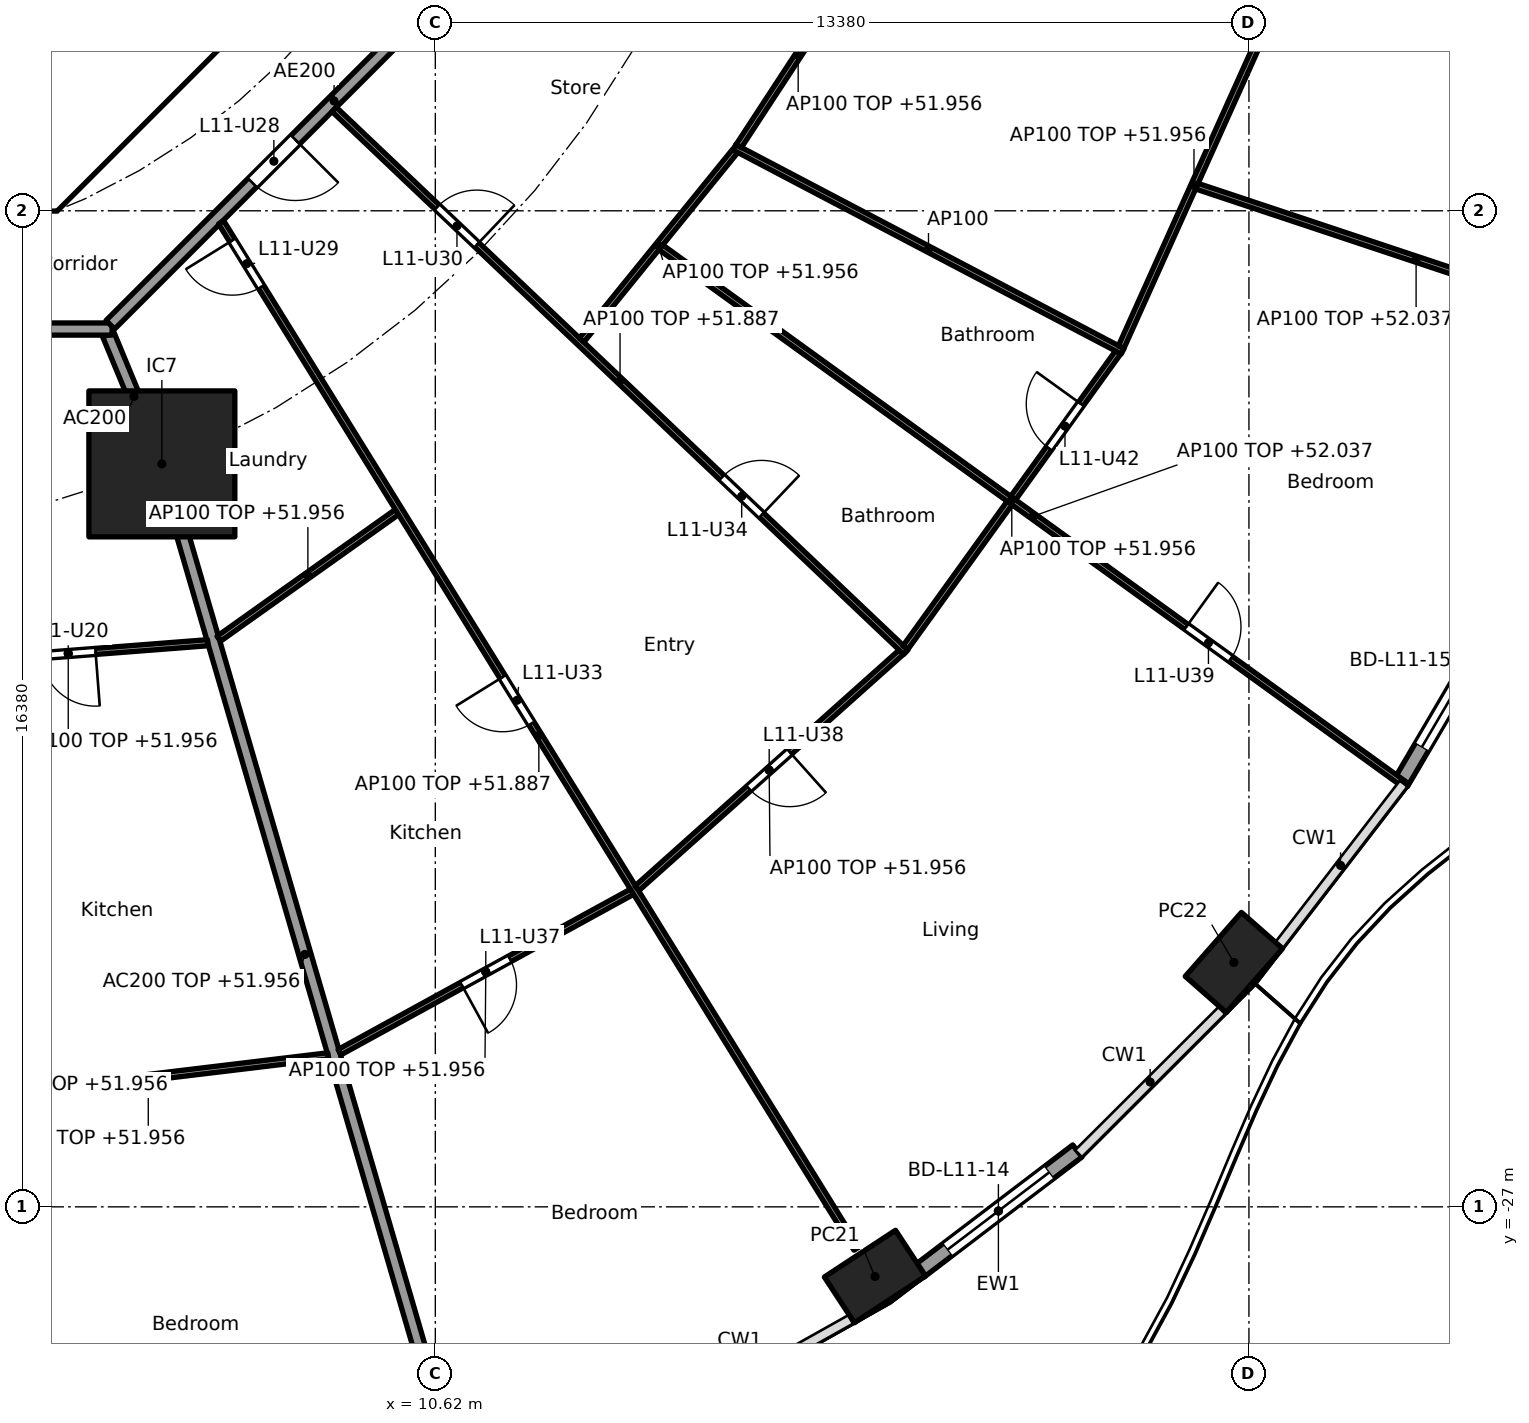
"""IFC4 building model, lengths in metres.
Left out: names, types, materials, properties, quantities, classifications, styles, units other than length and angle.
Written with IfcOpenShell. Run it as: python <this file> out.ifc"""

import sys

from ifc_helpers import new_model, si_unit, direction, frame, frame_2d, origin, origin_2d, place, context, subcontext, project, spatial, polyline, rectangle, hollow_rectangle, outline, extrude, element, fill, save


model = new_model("IFC4")
c1 = context("Model", 3, precision=1e-05, world=origin(), true_north=direction((0.0, 1.0)))
c2 = subcontext(c1, "Body", "Model", "MODEL_VIEW")
j1 = project(units=[si_unit("LENGTHUNIT", "METRE"), si_unit("PLANEANGLEUNIT", "RADIAN")], contexts=[c1])
p1 = place(None, origin())
s1 = spatial("IfcSite", under=j1, at=p1, CompositionType="ELEMENT")
p2 = place(p1, origin())
s2 = spatial("IfcBuilding", under=s1, at=p2, CompositionType="ELEMENT")
p3 = place(p2, frame((0.0, 0.0, 49.2)))
s3 = spatial("IfcBuildingStorey", under=s2, at=p3, CompositionType="ELEMENT", Elevation=49.2)
for number, where, z_axis, x_axis in (
    (1, (17.85, -28.146, 0.0), (0.0, 0.0, 1.0), (0.836, 0.549, 0.0)),
    (2, (23.752, -22.981, 0.0), (0.0, 0.0, 1.0), (0.66, 0.751, 0.0)),
):
    element("IfcColumn", number, at=place(p3, frame(where, z_axis=z_axis, x_axis=x_axis)), inside=s3, PredefinedType="COLUMN", context=c2, shape_type="SweptSolid", body=[
        extrude(hollow_rectangle(XDim=1.4, YDim=0.9, WallThickness=0.05, at=origin_2d()), origin(), (0.0, 0.0, 1.0), 3.7),
    ])
p4 = place(p3, frame((6.123, -14.782, 0.0), z_axis=(0.0, 0.0, 1.0), x_axis=(1.0, 0.0, 0.0)))
e3 = element("IfcColumn", 3, at=p4, inside=s3, PredefinedType="COLUMN", context=c2, shape_type="SweptSolid", body=[
    extrude(rectangle(XDim=2.4, YDim=2.4, at=origin_2d()), origin(), (0.0, 0.0, 1.0), 3.7),
])
p5 = place(p3, frame((21.178, -26.081, 0.0), z_axis=(0.0, 0.0, 1.0), x_axis=(-0.796022293214, -0.605267303517, 0.0)))
e4 = element("IfcWall", 4, at=p5, inside=s3, PredefinedType="SOLIDWALL", context=c2, shape_type="SweptSolid", body=[
    extrude(rectangle(XDim=3.262, YDim=0.25, at=frame_2d((1.631, 0.0))), origin(), (0.0, 0.0, 1.0), 3.44),
])
p6 = place(p5, frame((0.581, 0.0, 0.0)))
e5 = element("IfcOpeningElement", 5, at=p6, cuts=e4, PredefinedType="OPENING", context=c2, shape_type="SweptSolid", body=[
    extrude(rectangle(XDim=2.1, YDim=2.4, at=frame_2d((1.05, 1.2))), frame((0.0, 0.135, 0.0), z_axis=(0.0, -1.0, 0.0), x_axis=(1.0, 0.0, 0.0)), (0.0, 0.0, 1.0), 0.27),
])
p7 = place(p3, frame((28.252, -17.04, 0.0), z_axis=(0.0, 0.0, 1.0), x_axis=(-0.506311160839, -0.862350861546, 0.0)))
e6 = element("IfcWall", 6, at=p7, inside=s3, PredefinedType="SOLIDWALL", context=c2, shape_type="SweptSolid", body=[
    extrude(rectangle(XDim=3.462, YDim=0.25, at=frame_2d((1.731, 0.0))), origin(), (0.0, 0.0, 1.0), 3.44),
])
p8 = place(p7, frame((0.681, 0.0, 0.0)))
e7 = element("IfcOpeningElement", 7, at=p8, cuts=e6, PredefinedType="OPENING", context=c2, shape_type="SweptSolid", body=[
    extrude(rectangle(XDim=2.1, YDim=2.4, at=frame_2d((1.05, 1.2))), frame((0.0, 0.135, 0.0), z_axis=(0.0, -1.0, 0.0), x_axis=(1.0, 0.0, 0.0)), (0.0, 0.0, 1.0), 0.27),
])
p9 = place(p3, frame((4.613, -9.988, 0.0), z_axis=(0.0, 0.0, 1.0), x_axis=(0.707106781187, 0.707106781187, 0.0)))
e8 = element("IfcWall", 8, at=p9, inside=s3, PredefinedType="SHEAR", context=c2, shape_type="SweptSolid", body=[
    extrude(rectangle(XDim=7.602, YDim=0.6, at=frame_2d((3.801, 0.0))), origin(), (0.0, 0.0, 1.0), 3.44),
])
p10 = place(p9, frame((3.201, 0.0, 0.0)))
e9 = element("IfcOpeningElement", 9, at=p10, cuts=e8, PredefinedType="OPENING", context=c2, shape_type="SweptSolid", body=[
    extrude(rectangle(XDim=1.2, YDim=2.1, at=frame_2d((0.6, 1.05))), frame((0.0, 0.31, 0.0), z_axis=(0.0, -1.0, 0.0), x_axis=(1.0, 0.0, 0.0)), (0.0, 0.0, 1.0), 0.62),
])
p11 = place(p3, origin())
e10 = element("IfcWall", 10, at=p11, inside=s3, PredefinedType="SHEAR", context=c2, shape_type="SweptSolid", body=[
    extrude(outline(polyline([(-4.152, -10.025), (4.152, -10.025), (4.401, -9.776), (4.825, -10.2), (4.401, -10.625), (-4.401, -10.625), (-4.825, -10.2), (-4.401, -9.776), (-4.152, -10.025)])), origin(), (0.0, 0.0, 1.0), 3.44),
])
p12 = place(p3, frame((5.243, -12.657, 0.0), z_axis=(0.0, 0.0, 1.0), x_axis=(0.382707856524, -0.923869415315, 0.0)))
e11 = element("IfcWall", 11, at=p12, inside=s3, PredefinedType="PARTITIONING", context=c2, shape_type="SweptSolid", body=[
    extrude(rectangle(XDim=2.2, YDim=0.2, at=frame_2d((1.1, 0.0))), origin(), (0.0, 0.0, 1.0), 3.44),
])
p13 = place(p3, frame((6.137, -14.83, 0.0), z_axis=(0.0, 0.0, 1.0), x_axis=(0.27985745069, -0.960041565399, 0.0)))
e12 = element("IfcWall", 12, at=p13, inside=s3, PredefinedType="PARTITIONING", context=c2, shape_type="SweptSolid", body=[
    extrude(rectangle(XDim=16.705, YDim=0.2, at=frame_2d((8.353, 0.0))), origin(), (0.0, 0.0, 1.0), 2.756),
])
p14 = place(p3, frame((-5.104, -12.565, 0.0), z_axis=(0.0, 0.0, 1.0), x_axis=(1.0, 0.0, 0.0)))
e13 = element("IfcWall", 13, at=p14, inside=s3, PredefinedType="PARTITIONING", context=c2, shape_type="SweptSolid", body=[
    extrude(rectangle(XDim=10.409, YDim=0.2, at=frame_2d((5.205, 0.0))), origin(), (0.0, 0.0, 1.0), 3.44),
])
p15 = place(p14, frame((2.87, 0.0, 0.0)))
e14 = element("IfcOpeningElement", 14, at=p15, cuts=e13, PredefinedType="OPENING", context=c2, shape_type="SweptSolid", body=[
    extrude(rectangle(XDim=1.0, YDim=2.1, at=frame_2d((0.5, 1.05))), frame((0.0, 0.11, 0.0), z_axis=(0.0, -1.0, 0.0), x_axis=(1.0, 0.0, 0.0)), (0.0, 0.0, 1.0), 0.22),
])
p16 = place(p3, frame((5.275, -12.494, 0.0), z_axis=(0.0, 0.0, 1.0), x_axis=(0.707106781187, 0.707106781187, 0.0)))
e15 = element("IfcWall", 15, at=p16, inside=s3, PredefinedType="PARTITIONING", context=c2, shape_type="SweptSolid", body=[
    extrude(rectangle(XDim=10.409, YDim=0.2, at=frame_2d((5.205, 0.0))), origin(), (0.0, 0.0, 1.0), 3.44),
])
p17 = place(p16, frame((3.303, 0.0, 0.0)))
e16 = element("IfcOpeningElement", 16, at=p17, cuts=e15, PredefinedType="OPENING", context=c2, shape_type="SweptSolid", body=[
    extrude(rectangle(XDim=1.0, YDim=2.1, at=frame_2d((0.5, 1.05))), frame((0.0, 0.11, 0.0), z_axis=(0.0, -1.0, 0.0), x_axis=(1.0, 0.0, 0.0)), (0.0, 0.0, 1.0), 0.22),
])
p18 = place(p3, frame((2.288, -18.078, 0.0), z_axis=(0.0, 0.0, 1.0), x_axis=(0.99701850123, 0.077162868047, 0.0)))
e17 = element("IfcWall", 17, at=p18, inside=s3, PredefinedType="PARTITIONING", context=c2, shape_type="SweptSolid", body=[
    extrude(rectangle(XDim=4.604, YDim=0.1, at=frame_2d((2.302, 0.0))), origin(), (0.0, 0.0, 1.0), 2.756),
])
p19 = place(p18, frame((1.852, 0.0, 0.0)))
e18 = element("IfcOpeningElement", 18, at=p19, cuts=e17, PredefinedType="OPENING", context=c2, shape_type="SweptSolid", body=[
    extrude(rectangle(XDim=0.9, YDim=2.1, at=frame_2d((0.45, 1.05))), frame((0.0, 0.06, 0.0), z_axis=(0.0, -1.0, 0.0), x_axis=(1.0, 0.0, 0.0)), (0.0, 0.0, 1.0), 0.12),
])
p20 = place(p3, frame((2.941, -25.229, 0.0), z_axis=(0.0, 0.0, 1.0), x_axis=(0.992834127896, 0.119500604542, 0.0)))
e19 = element("IfcWall", 19, at=p20, inside=s3, PredefinedType="PARTITIONING", context=c2, shape_type="SweptSolid", body=[
    extrude(rectangle(XDim=5.959, YDim=0.1, at=frame_2d((2.98, 0.0))), origin(), (0.0, 0.0, 1.0), 2.756),
])
p21 = place(p3, frame((7.06, -17.657, 0.0), z_axis=(0.0, 0.0, 1.0), x_axis=(0.81492039338, 0.57957290521, 0.0)))
e20 = element("IfcWall", 20, at=p21, inside=s3, PredefinedType="PARTITIONING", context=c2, shape_type="SweptSolid", body=[
    extrude(rectangle(XDim=3.594, YDim=0.1, at=frame_2d((1.797, 0.0))), origin(), (0.0, 0.0, 1.0), 2.756),
])
p22 = place(p3, frame((9.045, -24.456, 0.0), z_axis=(0.0, 0.0, 1.0), x_axis=(0.876809987787, 0.480837025734, 0.0)))
e21 = element("IfcWall", 21, at=p22, inside=s3, PredefinedType="PARTITIONING", context=c2, shape_type="SweptSolid", body=[
    extrude(rectangle(XDim=5.486, YDim=0.1, at=frame_2d((2.743, 0.0))), origin(), (0.0, 0.0, 1.0), 2.756),
])
p23 = place(p22, frame((2.293, 0.0, 0.0)))
e22 = element("IfcOpeningElement", 22, at=p23, cuts=e21, PredefinedType="OPENING", context=c2, shape_type="SweptSolid", body=[
    extrude(rectangle(XDim=0.9, YDim=2.1, at=frame_2d((0.45, 1.05))), frame((0.0, 0.06, 0.0), z_axis=(0.0, -1.0, 0.0), x_axis=(1.0, 0.0, 0.0)), (0.0, 0.0, 1.0), 0.12),
])
p24 = place(p3, frame((7.097, -10.81, 0.0), z_axis=(0.0, 0.0, 1.0), x_axis=(0.526453266471, -0.850204068576, 0.0)))
e23 = element("IfcWall", 23, at=p24, inside=s3, PredefinedType="PARTITIONING", context=c2, shape_type="SweptSolid", body=[
    extrude(rectangle(XDim=19.85, YDim=0.1, at=frame_2d((9.925, 0.0))), origin(), (0.0, 0.0, 1.0), 2.687),
])
p25 = place(p24, frame((0.35, 0.0, 0.0)))
e24 = element("IfcOpeningElement", 24, at=p25, cuts=e23, PredefinedType="OPENING", context=c2, shape_type="SweptSolid", body=[
    extrude(rectangle(XDim=0.9, YDim=2.1, at=frame_2d((0.45, 1.05))), frame((0.0, 0.06, 0.0), z_axis=(0.0, -1.0, 0.0), x_axis=(1.0, 0.0, 0.0)), (0.0, 0.0, 1.0), 0.12),
])
p26 = place(p24, frame((8.795, 0.0, 0.0)))
e25 = element("IfcOpeningElement", 25, at=p26, cuts=e23, PredefinedType="OPENING", context=c2, shape_type="SweptSolid", body=[
    extrude(rectangle(XDim=0.9, YDim=2.1, at=frame_2d((0.45, 1.05))), frame((0.0, 0.06, 0.0), z_axis=(0.0, -1.0, 0.0), x_axis=(1.0, 0.0, 0.0)), (0.0, 0.0, 1.0), 0.12),
])
p27 = place(p3, frame((13.936, -21.761, 0.0), z_axis=(0.0, 0.0, 1.0), x_axis=(0.745806142791, 0.666163041136, 0.0)))
e26 = element("IfcWall", 26, at=p27, inside=s3, PredefinedType="PARTITIONING", context=c2, shape_type="SweptSolid", body=[
    extrude(rectangle(XDim=5.831, YDim=0.1, at=frame_2d((2.915, 0.0))), origin(), (0.0, 0.0, 1.0), 2.756),
])
p28 = place(p27, frame((2.465, 0.0, 0.0)))
e27 = element("IfcOpeningElement", 27, at=p28, cuts=e26, PredefinedType="OPENING", context=c2, shape_type="SweptSolid", body=[
    extrude(rectangle(XDim=0.9, YDim=2.1, at=frame_2d((0.45, 1.05))), frame((0.0, 0.06, 0.0), z_axis=(0.0, -1.0, 0.0), x_axis=(1.0, 0.0, 0.0)), (0.0, 0.0, 1.0), 0.12),
])
p29 = place(p3, frame((8.957, -8.953, 0.0), z_axis=(0.0, 0.0, 1.0), x_axis=(0.725250022034, -0.688485588476, 0.0)))
e28 = element("IfcWall", 28, at=p29, inside=s3, PredefinedType="PARTITIONING", context=c2, shape_type="SweptSolid", body=[
    extrude(rectangle(XDim=12.963, YDim=0.1, at=frame_2d((6.481, 0.0))), origin(), (0.0, 0.0, 1.0), 2.687),
])
p30 = place(p29, frame((2.333, 0.0, 0.0)))
e29 = element("IfcOpeningElement", 29, at=p30, cuts=e28, PredefinedType="OPENING", context=c2, shape_type="SweptSolid", body=[
    extrude(rectangle(XDim=0.9, YDim=2.1, at=frame_2d((0.45, 1.05))), frame((0.0, 0.06, 0.0), z_axis=(0.0, -1.0, 0.0), x_axis=(1.0, 0.0, 0.0)), (0.0, 0.0, 1.0), 0.12),
])
p31 = place(p29, frame((8.79, 0.0, 0.0)))
e30 = element("IfcOpeningElement", 30, at=p31, cuts=e28, PredefinedType="OPENING", context=c2, shape_type="SweptSolid", body=[
    extrude(rectangle(XDim=0.9, YDim=2.1, at=frame_2d((0.45, 1.05))), frame((0.0, 0.06, 0.0), z_axis=(0.0, -1.0, 0.0), x_axis=(1.0, 0.0, 0.0)), (0.0, 0.0, 1.0), 0.12),
])
p32 = place(p3, frame((13.026, -12.747, 0.0), z_axis=(0.0, 0.0, 1.0), x_axis=(0.630126826288, 0.776492229705, 0.0)))
e31 = element("IfcWall", 31, at=p32, inside=s3, PredefinedType="PARTITIONING", context=c2, shape_type="SweptSolid", body=[
    extrude(rectangle(XDim=4.007, YDim=0.1, at=frame_2d((2.003, 0.0))), origin(), (0.0, 0.0, 1.0), 2.756),
])
p33 = place(p3, frame((18.351, -17.803, 0.0), z_axis=(0.0, 0.0, 1.0), x_axis=(0.584563700282, 0.811347817099, 0.0)))
e32 = element("IfcWall", 32, at=p33, inside=s3, PredefinedType="PARTITIONING", context=c2, shape_type="SweptSolid", body=[
    extrude(rectangle(XDim=5.984, YDim=0.1, at=frame_2d((2.992, 0.0))), origin(), (0.0, 0.0, 1.0), 2.756),
])
p34 = place(p33, frame((4.038, 0.0, 0.0)))
e33 = element("IfcOpeningElement", 33, at=p34, cuts=e32, PredefinedType="OPENING", context=c2, shape_type="SweptSolid", body=[
    extrude(rectangle(XDim=0.9, YDim=2.1, at=frame_2d((0.45, 1.05))), frame((0.0, 0.06, 0.0), z_axis=(0.0, -1.0, 0.0), x_axis=(1.0, 0.0, 0.0)), (0.0, 0.0, 1.0), 0.12),
])
p35 = place(p3, frame((14.329, -11.221, 0.0), z_axis=(0.0, 0.0, 1.0), x_axis=(0.810671130917, -0.58550176558, 0.0)))
e34 = element("IfcWall", 34, at=p35, inside=s3, PredefinedType="PARTITIONING", context=c2, shape_type="SweptSolid", body=[
    extrude(rectangle(XDim=15.106, YDim=0.1, at=frame_2d((7.553, 0.0))), origin(), (0.0, 0.0, 1.0), 2.837),
])
p36 = place(p35, frame((10.659, 0.0, 0.0)))
e35 = element("IfcOpeningElement", 35, at=p36, cuts=e34, PredefinedType="OPENING", context=c2, shape_type="SweptSolid", body=[
    extrude(rectangle(XDim=0.9, YDim=2.1, at=frame_2d((0.45, 1.05))), frame((0.0, 0.06, 0.0), z_axis=(0.0, -1.0, 0.0), x_axis=(1.0, 0.0, 0.0)), (0.0, 0.0, 1.0), 0.12),
])
p37 = place(p3, frame((15.538, -9.574, 0.0), z_axis=(0.0, 0.0, 1.0), x_axis=(0.88517945493, -0.465249752895, 0.0)))
e36 = element("IfcWall", 36, at=p37, inside=s3, PredefinedType="PARTITIONING", context=c2, shape_type="SweptSolid", body=[
    extrude(rectangle(XDim=7.213, YDim=0.1, at=frame_2d((3.606, 0.0))), origin(), (0.0, 0.0, 1.0), 3.44),
])
p38 = place(p3, frame((15.609, -9.556, 0.0), z_axis=(0.0, 0.0, 1.0), x_axis=(0.547641765292, 0.836712911881, 0.0)))
e37 = element("IfcWall", 37, at=p38, inside=s3, PredefinedType="PARTITIONING", context=c2, shape_type="SweptSolid", body=[
    extrude(rectangle(XDim=3.57, YDim=0.1, at=frame_2d((1.785, 0.0))), origin(), (0.0, 0.0, 1.0), 2.756),
])
p39 = place(p3, frame((21.899, -12.861, 0.0), z_axis=(0.0, 0.0, 1.0), x_axis=(0.410197710154, 0.911996622025, 0.0)))
e38 = element("IfcWall", 38, at=p39, inside=s3, PredefinedType="PARTITIONING", context=c2, shape_type="SweptSolid", body=[
    extrude(rectangle(XDim=5.837, YDim=0.1, at=frame_2d((2.918, 0.0))), origin(), (0.0, 0.0, 1.0), 2.756),
])
p40 = place(p3, frame((23.144, -10.216, 0.0), z_axis=(0.0, 0.0, 1.0), x_axis=(0.948811715359, -0.315842253027, 0.0)))
e39 = element("IfcWall", 39, at=p40, inside=s3, PredefinedType="PARTITIONING", context=c2, shape_type="SweptSolid", body=[
    extrude(rectangle(XDim=7.6, YDim=0.1, at=frame_2d((3.8, 0.0))), origin(), (0.0, 0.0, 1.0), 2.837),
])
p41 = place(p6, origin())
e40 = element("IfcDoor", 40, at=p41, inside=s3, OperationType="SLIDING_TO_LEFT", PredefinedType="DOOR", context=c2, shape_type="SweptSolid", body=[
    extrude(rectangle(XDim=2.1, YDim=2.4, at=frame_2d((1.05, 1.2))), frame((0.0, 0.025, 0.0), z_axis=(0.0, -1.0, 0.0), x_axis=(1.0, 0.0, 0.0)), (0.0, 0.0, 1.0), 0.05),
])
fill(e5, e40)
p42 = place(p8, origin())
e41 = element("IfcDoor", 41, at=p42, inside=s3, OperationType="SLIDING_TO_LEFT", PredefinedType="DOOR", context=c2, shape_type="SweptSolid", body=[
    extrude(rectangle(XDim=2.1, YDim=2.4, at=frame_2d((1.05, 1.2))), frame((0.0, 0.025, 0.0), z_axis=(0.0, -1.0, 0.0), x_axis=(1.0, 0.0, 0.0)), (0.0, 0.0, 1.0), 0.05),
])
fill(e7, e41)
p43 = place(p19, frame((0.9, 0.0, 0.0), x_axis=(-1.0, 0.0, 0.0)))
e42 = element("IfcDoor", 42, at=p43, inside=s3, OperationType="SINGLE_SWING_LEFT", PredefinedType="DOOR", context=c2, shape_type="SweptSolid", body=[
    extrude(rectangle(XDim=0.9, YDim=2.1, at=frame_2d((0.45, 1.05))), frame((0.0, 0.025, 0.0), z_axis=(0.0, -1.0, 0.0), x_axis=(1.0, 0.0, 0.0)), (0.0, 0.0, 1.0), 0.05),
])
fill(e18, e42)
p44 = place(p17, frame((1.0, 0.0, 0.0), x_axis=(-1.0, 0.0, 0.0)))
e43 = element("IfcDoor", 43, at=p44, inside=s3, OperationType="SINGLE_SWING_LEFT", PredefinedType="DOOR", context=c2, shape_type="SweptSolid", body=[
    extrude(rectangle(XDim=1.0, YDim=2.1, at=frame_2d((0.5, 1.05))), frame((0.0, 0.025, 0.0), z_axis=(0.0, -1.0, 0.0), x_axis=(1.0, 0.0, 0.0)), (0.0, 0.0, 1.0), 0.05),
])
fill(e16, e43)
p45 = place(p25, frame((0.9, 0.0, 0.0), x_axis=(-1.0, 0.0, 0.0)))
e44 = element("IfcDoor", 44, at=p45, inside=s3, OperationType="SINGLE_SWING_RIGHT", PredefinedType="DOOR", context=c2, shape_type="SweptSolid", body=[
    extrude(rectangle(XDim=0.9, YDim=2.1, at=frame_2d((0.45, 1.05))), frame((0.0, 0.025, 0.0), z_axis=(0.0, -1.0, 0.0), x_axis=(1.0, 0.0, 0.0)), (0.0, 0.0, 1.0), 0.05),
])
fill(e24, e44)
p46 = place(p30, origin())
e45 = element("IfcDoor", 45, at=p46, inside=s3, OperationType="SINGLE_SWING_RIGHT", PredefinedType="DOOR", context=c2, shape_type="SweptSolid", body=[
    extrude(rectangle(XDim=0.9, YDim=2.1, at=frame_2d((0.45, 1.05))), frame((0.0, 0.025, 0.0), z_axis=(0.0, -1.0, 0.0), x_axis=(1.0, 0.0, 0.0)), (0.0, 0.0, 1.0), 0.05),
])
fill(e29, e45)
p47 = place(p26, frame((0.9, 0.0, 0.0), x_axis=(-1.0, 0.0, 0.0)))
e46 = element("IfcDoor", 46, at=p47, inside=s3, OperationType="SINGLE_SWING_RIGHT", PredefinedType="DOOR", context=c2, shape_type="SweptSolid", body=[
    extrude(rectangle(XDim=0.9, YDim=2.1, at=frame_2d((0.45, 1.05))), frame((0.0, 0.025, 0.0), z_axis=(0.0, -1.0, 0.0), x_axis=(1.0, 0.0, 0.0)), (0.0, 0.0, 1.0), 0.05),
])
fill(e25, e46)
p48 = place(p31, origin())
e47 = element("IfcDoor", 47, at=p48, inside=s3, OperationType="SINGLE_SWING_RIGHT", PredefinedType="DOOR", context=c2, shape_type="SweptSolid", body=[
    extrude(rectangle(XDim=0.9, YDim=2.1, at=frame_2d((0.45, 1.05))), frame((0.0, 0.025, 0.0), z_axis=(0.0, -1.0, 0.0), x_axis=(1.0, 0.0, 0.0)), (0.0, 0.0, 1.0), 0.05),
])
fill(e30, e47)
p49 = place(p23, frame((0.9, 0.0, 0.0), x_axis=(-1.0, 0.0, 0.0)))
e48 = element("IfcDoor", 48, at=p49, inside=s3, OperationType="SINGLE_SWING_RIGHT", PredefinedType="DOOR", context=c2, shape_type="SweptSolid", body=[
    extrude(rectangle(XDim=0.9, YDim=2.1, at=frame_2d((0.45, 1.05))), frame((0.0, 0.025, 0.0), z_axis=(0.0, -1.0, 0.0), x_axis=(1.0, 0.0, 0.0)), (0.0, 0.0, 1.0), 0.05),
])
fill(e22, e48)
p50 = place(p28, frame((0.9, 0.0, 0.0), x_axis=(-1.0, 0.0, 0.0)))
e49 = element("IfcDoor", 49, at=p50, inside=s3, OperationType="SINGLE_SWING_LEFT", PredefinedType="DOOR", context=c2, shape_type="SweptSolid", body=[
    extrude(rectangle(XDim=0.9, YDim=2.1, at=frame_2d((0.45, 1.05))), frame((0.0, 0.025, 0.0), z_axis=(0.0, -1.0, 0.0), x_axis=(1.0, 0.0, 0.0)), (0.0, 0.0, 1.0), 0.05),
])
fill(e27, e49)
p51 = place(p36, origin())
e50 = element("IfcDoor", 50, at=p51, inside=s3, OperationType="SINGLE_SWING_LEFT", PredefinedType="DOOR", context=c2, shape_type="SweptSolid", body=[
    extrude(rectangle(XDim=0.9, YDim=2.1, at=frame_2d((0.45, 1.05))), frame((0.0, 0.025, 0.0), z_axis=(0.0, -1.0, 0.0), x_axis=(1.0, 0.0, 0.0)), (0.0, 0.0, 1.0), 0.05),
])
fill(e35, e50)
p52 = place(p34, origin())
e51 = element("IfcDoor", 51, at=p52, inside=s3, OperationType="SINGLE_SWING_RIGHT", PredefinedType="DOOR", context=c2, shape_type="SweptSolid", body=[
    extrude(rectangle(XDim=0.9, YDim=2.1, at=frame_2d((0.45, 1.05))), frame((0.0, 0.025, 0.0), z_axis=(0.0, -1.0, 0.0), x_axis=(1.0, 0.0, 0.0)), (0.0, 0.0, 1.0), 0.05),
])
fill(e33, e51)
save(model, sys.argv[1])
